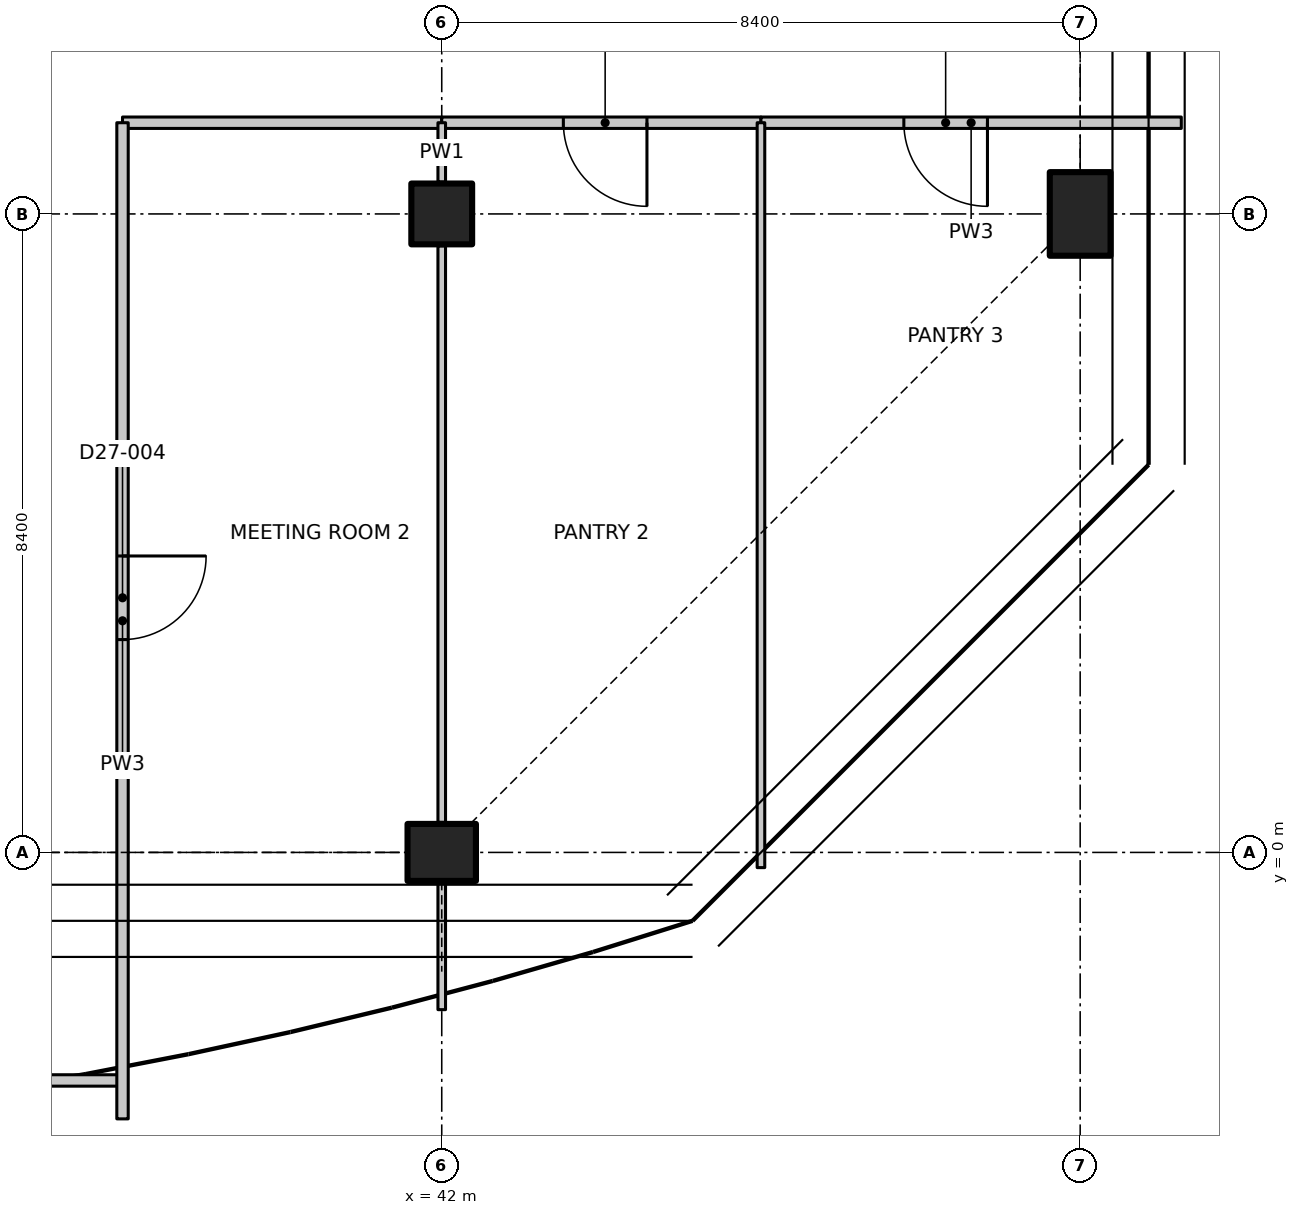
"""IFC4 building model, lengths in metres.
Left out: names, types, materials, properties, quantities, classifications, styles, units other than length and angle.
Written with IfcOpenShell. Run it as: python <this file> out.ifc"""

import sys

from ifc_helpers import new_model, si_unit, direction, frame, frame_2d, origin, origin_2d, place, context, subcontext, project, spatial, polyline, rectangle, outline, extrude, element, fill, save


model = new_model("IFC4")
c1 = context("Model", 3, precision=1e-05, world=origin(), true_north=direction((0.0, 1.0)))
c2 = subcontext(c1, "Body", "Model", "MODEL_VIEW")
j1 = project(units=[si_unit("LENGTHUNIT", "METRE"), si_unit("PLANEANGLEUNIT", "RADIAN")], contexts=[c1])
p1 = place(None, origin())
s1 = spatial("IfcSite", under=j1, at=p1, CompositionType="ELEMENT")
p2 = place(p1, origin())
s2 = spatial("IfcBuilding", under=s1, at=p2, CompositionType="ELEMENT")
p3 = place(p2, frame((0.0, 0.0, 215.7)))
s3 = spatial("IfcBuildingStorey", under=s2, at=p3, CompositionType="ELEMENT", Elevation=215.7)
p4 = place(p3, frame((42.0, 0.0, 0.0), z_axis=(0.0, 0.0, 1.0), x_axis=(0.0, 1.0, 0.0)))
e1 = element("IfcColumn", 1, at=p4, inside=s3, PredefinedType="COLUMN", context=c2, shape_type="SweptSolid", body=[
    extrude(rectangle(XDim=0.75, YDim=0.9, at=origin_2d()), origin(), (0.0, 0.0, 1.0), 3.35),
])
p5 = place(p3, frame((42.0, 8.4, 0.0), z_axis=(0.0, 0.0, 1.0), x_axis=(1.0, 0.0, 0.0)))
e2 = element("IfcColumn", 2, at=p5, inside=s3, PredefinedType="COLUMN", context=c2, shape_type="SweptSolid", body=[
    extrude(rectangle(XDim=0.8, YDim=0.8, at=origin_2d()), origin(), (0.0, 0.0, 1.0), 3.35),
])
p6 = place(p3, frame((50.4, 8.4, 0.0), z_axis=(0.0, 0.0, 1.0), x_axis=(1.0, 0.0, 0.0)))
e3 = element("IfcColumn", 3, at=p6, inside=s3, PredefinedType="COLUMN", context=c2, shape_type="SweptSolid", body=[
    extrude(rectangle(XDim=0.8, YDim=1.1, at=origin_2d()), origin(), (0.0, 0.0, 1.0), 3.35),
])
p7 = place(p3, frame((42.0, 9.6, 0.0), z_axis=(0.0, 0.0, 1.0), x_axis=(-1.0, 0.0, 0.0)))
e4 = element("IfcWall", 4, at=p7, inside=s3, PredefinedType="PARTITIONING", context=c2, shape_type="SweptSolid", body=[
    extrude(rectangle(XDim=4.2, YDim=0.15, at=frame_2d((2.1, 0.0))), origin(), (0.0, 0.0, 1.0), 3.33),
])
p8 = place(p3, frame((46.2, 9.6, 0.0), z_axis=(0.0, 0.0, 1.0), x_axis=(-1.0, 0.0, 0.0)))
e5 = element("IfcWall", 5, at=p8, inside=s3, PredefinedType="PARTITIONING", context=c2, shape_type="SweptSolid", body=[
    extrude(rectangle(XDim=4.2, YDim=0.15, at=frame_2d((2.1, 0.0))), origin(), (0.0, 0.0, 1.0), 3.33),
])
p9 = place(p8, frame((1.5, 0.0, 0.0)))
e6 = element("IfcOpeningElement", 6, at=p9, cuts=e5, PredefinedType="OPENING", context=c2, shape_type="SweptSolid", body=[
    extrude(rectangle(XDim=1.1, YDim=2.1, at=frame_2d((0.55, 1.05))), frame((0.0, 0.085, 0.0), z_axis=(0.0, -1.0, 0.0), x_axis=(1.0, 0.0, 0.0)), (0.0, 0.0, 1.0), 0.17),
])
p10 = place(p3, frame((51.73, 9.6, 0.0), z_axis=(0.0, 0.0, 1.0), x_axis=(-1.0, 0.0, 0.0)))
e7 = element("IfcWall", 7, at=p10, inside=s3, PredefinedType="PARTITIONING", context=c2, shape_type="SweptSolid", body=[
    extrude(outline(polyline([(0.0, 0.0), (5.531, 0.0), (5.531, 3.33), (1.781, 3.33), (1.779, 2.98), (0.883, 2.98), (0.881, 3.33), (0.25, 3.33), (0.0, 3.33), (0.0, 0.0)])), frame((0.0, 0.075, 0.0), z_axis=(0.0, -1.0, 0.0), x_axis=(1.0, 0.0, 0.0)), (0.0, 0.0, 1.0), 0.15),
])
p11 = place(p10, frame((2.551, 0.0, 0.0)))
e8 = element("IfcOpeningElement", 8, at=p11, cuts=e7, PredefinedType="OPENING", context=c2, shape_type="SweptSolid", body=[
    extrude(rectangle(XDim=1.1, YDim=2.1, at=frame_2d((0.55, 1.05))), frame((0.0, 0.085, 0.0), z_axis=(0.0, -1.0, 0.0), x_axis=(1.0, 0.0, 0.0)), (0.0, 0.0, 1.0), 0.17),
])
p12 = place(p3, frame((37.831, -3.0, 0.0), z_axis=(0.0, 0.0, 1.0), x_axis=(-1.0, 0.0, 0.0)))
e9 = element("IfcWall", 9, at=p12, inside=s3, PredefinedType="PARTITIONING", context=c2, shape_type="SweptSolid", body=[
    extrude(rectangle(XDim=4.231, YDim=0.15, at=frame_2d((2.115, 0.0))), origin(), (0.0, 0.0, 1.0), 2.98),
])
p13 = place(p3, frame((37.8, 9.6, 0.0), z_axis=(0.0, 0.0, 1.0), x_axis=(0.0, -1.0, 0.0)))
e10 = element("IfcWall", 10, at=p13, inside=s3, PredefinedType="PARTITIONING", context=c2, shape_type="SweptSolid", body=[
    extrude(outline(polyline([(0.0, 0.0), (13.106, 0.0), (13.105, 3.33), (12.622, 3.33), (10.05, 3.33), (10.048, 2.98), (9.152, 2.98), (9.15, 3.33), (0.0, 3.33), (0.0, 0.0)])), frame((0.0, 0.075, 0.0), z_axis=(0.0, -1.0, 0.0), x_axis=(1.0, 0.0, 0.0)), (0.0, 0.0, 1.0), 0.15),
])
p14 = place(p13, frame((5.7, 0.0, 0.0)))
e11 = element("IfcOpeningElement", 11, at=p14, cuts=e10, PredefinedType="OPENING", context=c2, shape_type="SweptSolid", body=[
    extrude(rectangle(XDim=1.1, YDim=2.1, at=frame_2d((0.55, 1.05))), frame((0.0, 0.085, 0.0), z_axis=(0.0, -1.0, 0.0), x_axis=(1.0, 0.0, 0.0)), (0.0, 0.0, 1.0), 0.17),
])
p15 = place(p3, frame((42.0, 9.6, 0.0), z_axis=(0.0, 0.0, 1.0), x_axis=(0.0, -1.0, 0.0)))
e12 = element("IfcWall", 12, at=p15, inside=s3, PredefinedType="PARTITIONING", context=c2, shape_type="SweptSolid", body=[
    extrude(rectangle(XDim=0.78, YDim=0.1, at=frame_2d((0.39, 0.0))), origin(), (0.0, 0.0, 1.0), 3.33),
])
p16 = place(p3, frame((42.0, 7.98, 0.0), z_axis=(0.0, 0.0, 1.0), x_axis=(0.0, -1.0, 0.0)))
e13 = element("IfcWall", 13, at=p16, inside=s3, PredefinedType="PARTITIONING", context=c2, shape_type="SweptSolid", body=[
    extrude(outline(polyline([(0.0, 0.0), (7.585, 0.0), (7.585, 2.98), (7.316, 2.98), (7.314, 3.33), (0.0, 3.33), (0.0, 0.0)])), frame((0.0, 0.05, 0.0), z_axis=(0.0, -1.0, 0.0), x_axis=(1.0, 0.0, 0.0)), (0.0, 0.0, 1.0), 0.1),
])
p17 = place(p3, frame((42.0, -0.395, 0.0), z_axis=(0.0, 0.0, 1.0), x_axis=(0.0, -1.0, 0.0)))
e14 = element("IfcWall", 14, at=p17, inside=s3, PredefinedType="PARTITIONING", context=c2, shape_type="SweptSolid", body=[
    extrude(rectangle(XDim=1.674, YDim=0.1, at=frame_2d((0.837, 0.0))), origin(), (0.0, 0.0, 1.0), 2.98),
])
p18 = place(p3, frame((46.2, 9.6, 0.0), z_axis=(0.0, 0.0, 1.0), x_axis=(0.0, -1.0, 0.0)))
e15 = element("IfcWall", 15, at=p18, inside=s3, PredefinedType="PARTITIONING", context=c2, shape_type="SweptSolid", body=[
    extrude(outline(polyline([(0.0, 0.0), (9.8, 0.0), (9.8, 3.33), (6.066, 3.33), (6.064, 2.98), (4.736, 2.98), (4.734, 3.33), (0.0, 3.33), (0.0, 0.0)])), frame((0.0, 0.05, 0.0), z_axis=(0.0, -1.0, 0.0), x_axis=(1.0, 0.0, 0.0)), (0.0, 0.0, 1.0), 0.1),
])
p19 = place(p14, origin())
e16 = element("IfcDoor", 16, at=p19, inside=s3, OperationType="SINGLE_SWING_LEFT", PredefinedType="DOOR", context=c2, shape_type="SweptSolid", body=[
    extrude(rectangle(XDim=1.1, YDim=2.1, at=frame_2d((0.55, 1.05))), frame((0.0, 0.025, 0.0), z_axis=(0.0, -1.0, 0.0), x_axis=(1.0, 0.0, 0.0)), (0.0, 0.0, 1.0), 0.05),
])
fill(e11, e16)
p20 = place(p9, origin())
e17 = element("IfcDoor", 17, at=p20, inside=s3, OperationType="SINGLE_SWING_LEFT", PredefinedType="DOOR", context=c2, shape_type="SweptSolid", body=[
    extrude(rectangle(XDim=1.1, YDim=2.1, at=frame_2d((0.55, 1.05))), frame((0.0, 0.025, 0.0), z_axis=(0.0, -1.0, 0.0), x_axis=(1.0, 0.0, 0.0)), (0.0, 0.0, 1.0), 0.05),
])
fill(e6, e17)
p21 = place(p11, origin())
e18 = element("IfcDoor", 18, at=p21, inside=s3, OperationType="SINGLE_SWING_LEFT", PredefinedType="DOOR", context=c2, shape_type="SweptSolid", body=[
    extrude(rectangle(XDim=1.1, YDim=2.1, at=frame_2d((0.55, 1.05))), frame((0.0, 0.025, 0.0), z_axis=(0.0, -1.0, 0.0), x_axis=(1.0, 0.0, 0.0)), (0.0, 0.0, 1.0), 0.05),
])
fill(e8, e18)
save(model, sys.argv[1])
